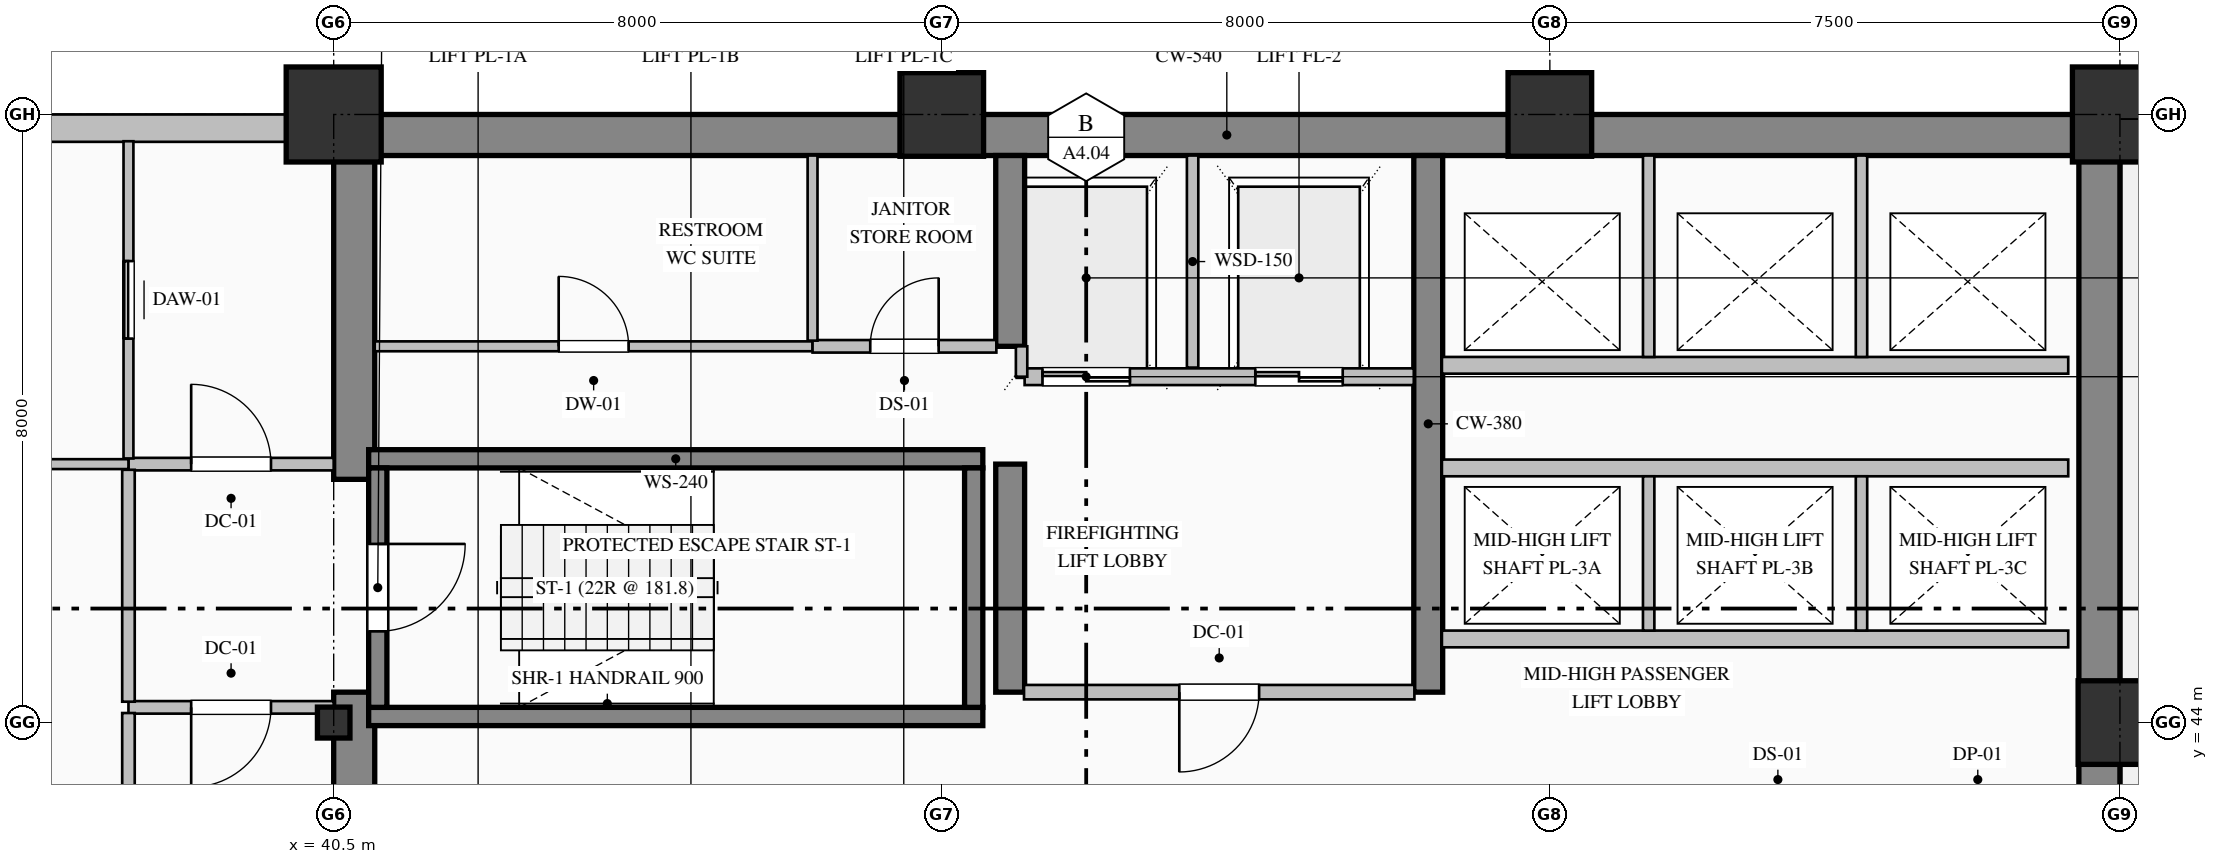
"""IFC4 building model, lengths in metres.
Left out: names, types, materials, properties, quantities, classifications, styles, units other than length and angle.
Written with IfcOpenShell. Run it as: python <this file> out.ifc"""

import sys

from ifc_helpers import new_model, si_unit, direction, frame, frame_2d, origin, origin_2d, place, context, subcontext, project, spatial, rectangle, hollow_rectangle, i_section, extrude, element, fill, save


model = new_model("IFC4")
c1 = context("Model", 3, precision=1e-05, world=origin(), true_north=direction((0.0, 1.0)))
c2 = subcontext(c1, "Body", "Model", "MODEL_VIEW")
j1 = project(units=[si_unit("LENGTHUNIT", "METRE"), si_unit("PLANEANGLEUNIT", "RADIAN")], contexts=[c1])
p1 = place(None, origin())
s1 = spatial("IfcSite", under=j1, at=p1, CompositionType="ELEMENT")
p2 = place(p1, origin())
s2 = spatial("IfcBuilding", under=s1, at=p2, CompositionType="ELEMENT")
p3 = place(p2, frame((0.0, 0.0, 28.2)))
s3 = spatial("IfcBuildingStorey", under=s2, at=p3, CompositionType="ELEMENT", Elevation=28.2)
p4 = place(p3, frame((40.5, 51.73, 0.0), z_axis=(0.0, 0.0, 1.0), x_axis=(1.0, 0.0, 0.0)))
e1 = element("IfcWall", 1, at=p4, inside=s3, PredefinedType="SHEAR", context=c2, shape_type="SweptSolid", body=[
    extrude(rectangle(XDim=23.5, YDim=0.54, at=frame_2d((11.75, 0.0))), origin(), (0.0, 0.0, 1.0), 3.75),
])
p5 = place(p3, frame((63.73, 36.32, 0.0), z_axis=(0.0, 0.0, 1.0), x_axis=(0.0, 1.0, 0.0)))
e2 = element("IfcWall", 2, at=p5, inside=s3, PredefinedType="SHEAR", context=c2, shape_type="SweptSolid", body=[
    extrude(rectangle(XDim=15.14, YDim=0.54, at=frame_2d((7.57, 0.0))), origin(), (0.0, 0.0, 1.0), 3.75),
])
p6 = place(p3, frame((40.77, 36.54, 0.0), z_axis=(0.0, 0.0, 1.0), x_axis=(0.0, 1.0, 0.0)))
e3 = element("IfcWall", 3, at=p6, inside=s3, PredefinedType="SHEAR", context=c2, shape_type="SweptSolid", body=[
    extrude(rectangle(XDim=7.86, YDim=0.54, at=frame_2d((3.93, 0.0))), origin(), (0.0, 0.0, 1.0), 3.75),
])
p7 = place(p3, frame((40.77, 47.2, 0.0), z_axis=(0.0, 0.0, 1.0), x_axis=(0.0, 1.0, 0.0)))
e4 = element("IfcWall", 4, at=p7, inside=s3, PredefinedType="SHEAR", context=c2, shape_type="SweptSolid", body=[
    extrude(rectangle(XDim=4.26, YDim=0.54, at=frame_2d((2.13, 0.0))), origin(), (0.0, 0.0, 1.0), 3.75),
])
p8 = place(p3, frame((49.4, 44.4, 0.0), z_axis=(0.0, 0.0, 1.0), x_axis=(0.0, 1.0, 0.0)))
e5 = element("IfcWall", 5, at=p8, inside=s3, PredefinedType="SHEAR", context=c2, shape_type="SweptSolid", body=[
    extrude(rectangle(XDim=3.0, YDim=0.38, at=frame_2d((1.5, 0.0))), origin(), (0.0, 0.0, 1.0), 3.75),
])
p9 = place(p3, frame((49.4, 48.95, 0.0), z_axis=(0.0, 0.0, 1.0), x_axis=(0.0, 1.0, 0.0)))
e6 = element("IfcWall", 6, at=p9, inside=s3, PredefinedType="SHEAR", context=c2, shape_type="SweptSolid", body=[
    extrude(rectangle(XDim=2.51, YDim=0.38, at=frame_2d((1.255, 0.0))), origin(), (0.0, 0.0, 1.0), 3.75),
])
p10 = place(p3, frame((54.9, 44.4, 0.0), z_axis=(0.0, 0.0, 1.0), x_axis=(0.0, 1.0, 0.0)))
e7 = element("IfcWall", 7, at=p10, inside=s3, PredefinedType="SHEAR", context=c2, shape_type="SweptSolid", body=[
    extrude(rectangle(XDim=7.06, YDim=0.38, at=frame_2d((3.53, 0.0))), origin(), (0.0, 0.0, 1.0), 3.75),
])
p11 = place(p3, frame((40.5, 44.0, 0.0), z_axis=(0.0, 0.0, 1.0), x_axis=(1.0, 0.0, 0.0)))
e8 = element("IfcColumn", 8, at=p11, inside=s3, PredefinedType="COLUMN", context=c2, shape_type="SweptSolid", body=[
    extrude(i_section(OverallWidth=0.407, OverallDepth=0.428, WebThickness=0.02, FlangeThickness=0.035, FilletRadius=0.022, at=origin_2d()), origin(), (0.0, 0.0, 1.0), 4.0),
])
p12 = place(p3, frame((40.5, 52.0, 0.0), z_axis=(0.0, 0.0, 1.0), x_axis=(1.0, 0.0, 0.0)))
e9 = element("IfcColumn", 9, at=p12, inside=s3, PredefinedType="COLUMN", context=c2, shape_type="SweptSolid", body=[
    extrude(hollow_rectangle(XDim=1.25, YDim=1.25, WallThickness=0.045, at=origin_2d()), origin(), (0.0, 0.0, 1.0), 4.0),
])
for number, where, z_axis, x_axis in (
    (10, (48.5, 52.0, 0.0), (0.0, 0.0, 1.0), (1.0, 0.0, 0.0)),
    (11, (56.5, 52.0, 0.0), (0.0, 0.0, 1.0), (1.0, 0.0, 0.0)),
    (12, (64.0, 44.0, 0.0), (0.0, 0.0, 1.0), (1.0, 0.0, 0.0)),
):
    element("IfcColumn", number, at=place(p3, frame(where, z_axis=z_axis, x_axis=x_axis)), inside=s3, PredefinedType="COLUMN", context=c2, shape_type="SweptSolid", body=[
        extrude(hollow_rectangle(XDim=1.1, YDim=1.1, WallThickness=0.04, at=origin_2d()), origin(), (0.0, 0.0, 1.0), 4.0),
    ])
p13 = place(p3, frame((64.0, 52.0, 0.0), z_axis=(0.0, 0.0, 1.0), x_axis=(1.0, 0.0, 0.0)))
e13 = element("IfcColumn", 13, at=p13, inside=s3, PredefinedType="COLUMN", context=c2, shape_type="SweptSolid", body=[
    extrude(hollow_rectangle(XDim=1.25, YDim=1.25, WallThickness=0.045, at=origin_2d()), origin(), (0.0, 0.0, 1.0), 4.0),
])
p14 = place(p3, frame((4.0, 51.82, 0.0), z_axis=(0.0, 0.0, 1.0), x_axis=(1.0, 0.0, 0.0)))
e14 = element("IfcWall", 14, at=p14, inside=s3, PredefinedType="SOLIDWALL", context=c2, shape_type="SweptSolid", body=[
    extrude(rectangle(XDim=36.52, YDim=0.36, at=frame_2d((18.26, 0.0))), origin(), (0.0, 0.0, 1.0), 3.25),
])
p15 = place(p14, frame((6.3, 0.0, 0.85)))
e15 = element("IfcOpeningElement", 15, at=p15, cuts=e14, PredefinedType="OPENING", context=c2, shape_type="SweptSolid", body=[
    extrude(rectangle(XDim=1.8, YDim=2.05, at=frame_2d((0.9, 1.025))), frame((0.0, 0.19, 0.0), z_axis=(0.0, -1.0, 0.0), x_axis=(1.0, 0.0, 0.0)), (0.0, 0.0, 1.0), 0.38),
])
p16 = place(p14, frame((17.1, 0.0, 0.85)))
e16 = element("IfcOpeningElement", 16, at=p16, cuts=e14, PredefinedType="OPENING", context=c2, shape_type="SweptSolid", body=[
    extrude(rectangle(XDim=1.8, YDim=2.05, at=frame_2d((0.9, 1.025))), frame((0.0, 0.19, 0.0), z_axis=(0.0, -1.0, 0.0), x_axis=(1.0, 0.0, 0.0)), (0.0, 0.0, 1.0), 0.38),
])
p17 = place(p14, frame((24.0, 0.0, 0.8)))
e17 = element("IfcOpeningElement", 17, at=p17, cuts=e14, PredefinedType="OPENING", context=c2, shape_type="SweptSolid", body=[
    extrude(rectangle(XDim=2.4, YDim=2.15, at=frame_2d((1.2, 1.075))), frame((0.0, 0.19, 0.0), z_axis=(0.0, -1.0, 0.0), x_axis=(1.0, 0.0, 0.0)), (0.0, 0.0, 1.0), 0.38),
])
for number, where, z_axis, x_axis in (
    (18, (40.96, 47.47, 0.0), (0.0, 0.0, 1.0), (1.0, 0.0, 0.0)),
    (19, (49.04, 44.08, 0.0), (0.0, 0.0, 1.0), (-1.0, 0.0, 0.0)),
):
    element("IfcWall", number, at=place(p3, frame(where, z_axis=z_axis, x_axis=x_axis)), inside=s3, PredefinedType="SOLIDWALL", context=c2, shape_type="SweptSolid", body=[
        extrude(rectangle(XDim=8.08, YDim=0.24, at=frame_2d((4.04, 0.0))), origin(), (0.0, 0.0, 1.0), 4.0),
    ])
p18 = place(p3, frame((41.08, 47.35, 0.0), z_axis=(0.0, 0.0, 1.0), x_axis=(0.0, -1.0, 0.0)))
e20 = element("IfcWall", 20, at=p18, inside=s3, PredefinedType="SOLIDWALL", context=c2, shape_type="SweptSolid", body=[
    extrude(rectangle(XDim=3.15, YDim=0.24, at=frame_2d((1.575, 0.0))), origin(), (0.0, 0.0, 1.0), 4.0),
])
p19 = place(p18, frame((1.0, 0.0, 0.0)))
e21 = element("IfcOpeningElement", 21, at=p19, cuts=e20, PredefinedType="OPENING", context=c2, shape_type="SweptSolid", body=[
    extrude(rectangle(XDim=1.15, YDim=2.2, at=frame_2d((0.575, 1.1))), frame((0.0, 0.13, 0.0), z_axis=(0.0, -1.0, 0.0), x_axis=(1.0, 0.0, 0.0)), (0.0, 0.0, 1.0), 0.26),
])
p20 = place(p3, frame((48.92, 44.2, 0.0), z_axis=(0.0, 0.0, 1.0), x_axis=(0.0, 1.0, 0.0)))
e22 = element("IfcWall", 22, at=p20, inside=s3, PredefinedType="SOLIDWALL", context=c2, shape_type="SweptSolid", body=[
    extrude(rectangle(XDim=3.15, YDim=0.24, at=frame_2d((1.575, 0.0))), origin(), (0.0, 0.0, 1.0), 4.0),
])
p21 = place(p3, frame((54.71, 48.55, 0.0), z_axis=(0.0, 0.0, 1.0), x_axis=(-1.0, 0.0, 0.0)))
e23 = element("IfcWall", 23, at=p21, inside=s3, PredefinedType="PARTITIONING", context=c2, shape_type="SweptSolid", body=[
    extrude(rectangle(XDim=5.12, YDim=0.22, at=frame_2d((2.56, 0.0))), origin(), (0.0, 0.0, 1.0), 3.75),
])
p22 = place(p21, frame((3.735, 0.0, 0.0)))
e24 = element("IfcOpeningElement", 24, at=p22, cuts=e23, PredefinedType="OPENING", context=c2, shape_type="SweptSolid", body=[
    extrude(rectangle(XDim=1.15, YDim=2.2, at=frame_2d((0.575, 1.1))), frame((0.0, 0.12, 0.0), z_axis=(0.0, -1.0, 0.0), x_axis=(1.0, 0.0, 0.0)), (0.0, 0.0, 1.0), 0.24),
])
p23 = place(p21, frame((0.935, 0.0, 0.0)))
e25 = element("IfcOpeningElement", 25, at=p23, cuts=e23, PredefinedType="OPENING", context=c2, shape_type="SweptSolid", body=[
    extrude(rectangle(XDim=1.15, YDim=2.2, at=frame_2d((0.575, 1.1))), frame((0.0, 0.12, 0.0), z_axis=(0.0, -1.0, 0.0), x_axis=(1.0, 0.0, 0.0)), (0.0, 0.0, 1.0), 0.24),
])
p24 = place(p3, frame((51.8, 48.67, 0.0), z_axis=(0.0, 0.0, 1.0), x_axis=(0.0, 1.0, 0.0)))
e26 = element("IfcWall", 26, at=p24, inside=s3, PredefinedType="PARTITIONING", context=c2, shape_type="SweptSolid", body=[
    extrude(rectangle(XDim=2.79, YDim=0.15, at=frame_2d((1.395, 0.0))), origin(), (0.0, 0.0, 1.0), 3.75),
])
p25 = place(p3, frame((49.55, 48.55, 0.0), z_axis=(0.0, 0.0, 1.0), x_axis=(0.0, 1.0, 0.0)))
e27 = element("IfcWall", 27, at=p25, inside=s3, PredefinedType="PARTITIONING", context=c2, shape_type="SweptSolid", body=[
    extrude(rectangle(XDim=0.4, YDim=0.15, at=frame_2d((0.2, 0.0))), origin(), (0.0, 0.0, 1.0), 3.75),
])
for number, where, z_axis, x_axis in (
    (28, (63.32, 45.1, 0.0), (0.0, 0.0, 1.0), (-1.0, 0.0, 0.0)),
    (29, (55.08, 47.35, 0.0), (0.0, 0.0, 1.0), (1.0, 0.0, 0.0)),
):
    element("IfcWall", number, at=place(p3, frame(where, z_axis=z_axis, x_axis=x_axis)), inside=s3, PredefinedType="PARTITIONING", context=c2, shape_type="SweptSolid", body=[
        extrude(rectangle(XDim=8.24, YDim=0.22, at=frame_2d((4.12, 0.0))), origin(), (0.0, 0.0, 1.0), 3.75),
    ])
for number, where, z_axis, x_axis in (
    (30, (57.8, 45.21, 0.0), (0.0, 0.0, 1.0), (0.0, 1.0, 0.0)),
    (31, (60.6, 45.21, 0.0), (0.0, 0.0, 1.0), (0.0, 1.0, 0.0)),
):
    element("IfcWall", number, at=place(p3, frame(where, z_axis=z_axis, x_axis=x_axis)), inside=s3, PredefinedType="PARTITIONING", context=c2, shape_type="SweptSolid", body=[
        extrude(rectangle(XDim=2.03, YDim=0.15, at=frame_2d((1.015, 0.0))), origin(), (0.0, 0.0, 1.0), 3.75),
    ])
p26 = place(p3, frame((63.32, 48.7, 0.0), z_axis=(0.0, 0.0, 1.0), x_axis=(-1.0, 0.0, 0.0)))
e32 = element("IfcWall", 32, at=p26, inside=s3, PredefinedType="PARTITIONING", context=c2, shape_type="SweptSolid", body=[
    extrude(rectangle(XDim=8.24, YDim=0.22, at=frame_2d((4.12, 0.0))), origin(), (0.0, 0.0, 1.0), 3.75),
])
for number, where, z_axis, x_axis in (
    (33, (57.8, 48.81, 0.0), (0.0, 0.0, 1.0), (0.0, 1.0, 0.0)),
    (34, (60.6, 48.81, 0.0), (0.0, 0.0, 1.0), (0.0, 1.0, 0.0)),
):
    element("IfcWall", number, at=place(p3, frame(where, z_axis=z_axis, x_axis=x_axis)), inside=s3, PredefinedType="PARTITIONING", context=c2, shape_type="SweptSolid", body=[
        extrude(rectangle(XDim=2.65, YDim=0.15, at=frame_2d((1.325, 0.0))), origin(), (0.0, 0.0, 1.0), 3.75),
    ])
p27 = place(p3, frame((37.8, 47.4, 0.0), z_axis=(0.0, 0.0, 1.0), x_axis=(1.0, 0.0, 0.0)))
e35 = element("IfcWall", 35, at=p27, inside=s3, PredefinedType="PARTITIONING", context=c2, shape_type="SweptSolid", body=[
    extrude(rectangle(XDim=2.7, YDim=0.165, at=frame_2d((1.35, 0.0))), origin(), (0.0, 0.0, 1.0), 3.75),
])
p28 = place(p27, frame((0.825, 0.0, 0.0)))
e36 = element("IfcOpeningElement", 36, at=p28, cuts=e35, PredefinedType="OPENING", context=c2, shape_type="SweptSolid", body=[
    extrude(rectangle(XDim=1.05, YDim=2.15, at=frame_2d((0.525, 1.075))), frame((0.0, 0.093, 0.0), z_axis=(0.0, -1.0, 0.0), x_axis=(1.0, 0.0, 0.0)), (0.0, 0.0, 1.0), 0.185),
])
p29 = place(p3, frame((40.5, 44.2, 0.0), z_axis=(0.0, 0.0, 1.0), x_axis=(-1.0, 0.0, 0.0)))
e37 = element("IfcWall", 37, at=p29, inside=s3, PredefinedType="PARTITIONING", context=c2, shape_type="SweptSolid", body=[
    extrude(rectangle(XDim=2.7, YDim=0.165, at=frame_2d((1.35, 0.0))), origin(), (0.0, 0.0, 1.0), 3.75),
])
p30 = place(p29, frame((0.825, 0.0, 0.0)))
e38 = element("IfcOpeningElement", 38, at=p30, cuts=e37, PredefinedType="OPENING", context=c2, shape_type="SweptSolid", body=[
    extrude(rectangle(XDim=1.05, YDim=2.15, at=frame_2d((0.525, 1.075))), frame((0.0, 0.093, 0.0), z_axis=(0.0, -1.0, 0.0), x_axis=(1.0, 0.0, 0.0)), (0.0, 0.0, 1.0), 0.185),
])
p31 = place(p3, frame((37.8, 44.274, 0.0), z_axis=(0.0, 0.0, 1.0), x_axis=(0.0, 1.0, 0.0)))
e39 = element("IfcWall", 39, at=p31, inside=s3, PredefinedType="PARTITIONING", context=c2, shape_type="SweptSolid", body=[
    extrude(rectangle(XDim=3.051, YDim=0.165, at=frame_2d((1.525, 0.0))), origin(), (0.0, 0.0, 1.0), 3.75),
])
p32 = place(p3, frame((37.8, 47.475, 0.0), z_axis=(0.0, 0.0, 1.0), x_axis=(0.0, 1.0, 0.0)))
e40 = element("IfcWall", 40, at=p32, inside=s3, PredefinedType="PARTITIONING", context=c2, shape_type="SweptSolid", body=[
    extrude(rectangle(XDim=4.173, YDim=0.13, at=frame_2d((2.087, 0.0))), origin(), (0.0, 0.0, 1.0), 3.75),
])
p33 = place(p32, frame((1.577, 0.0, 0.0)))
e41 = element("IfcOpeningElement", 41, at=p33, cuts=e40, PredefinedType="OPENING", context=c2, shape_type="SweptSolid", body=[
    extrude(rectangle(XDim=1.02, YDim=2.15, at=frame_2d((0.51, 1.075))), frame((0.0, 0.075, 0.0), z_axis=(0.0, -1.0, 0.0), x_axis=(1.0, 0.0, 0.0)), (0.0, 0.0, 1.0), 0.15),
])
p34 = place(p3, frame((37.8, 47.4, 0.0), z_axis=(0.0, 0.0, 1.0), x_axis=(-1.0, 0.0, 0.0)))
e42 = element("IfcWall", 42, at=p34, inside=s3, PredefinedType="PARTITIONING", context=c2, shape_type="SweptSolid", body=[
    extrude(rectangle(XDim=2.4, YDim=0.13, at=frame_2d((1.2, 0.0))), origin(), (0.0, 0.0, 1.0), 3.75),
])
p35 = place(p3, frame((41.04, 48.95, 0.0), z_axis=(0.0, 0.0, 1.0), x_axis=(1.0, 0.0, 0.0)))
e43 = element("IfcWall", 43, at=p35, inside=s3, PredefinedType="PARTITIONING", context=c2, shape_type="SweptSolid", body=[
    extrude(rectangle(XDim=5.76, YDim=0.13, at=frame_2d((2.88, 0.0))), origin(), (0.0, 0.0, 1.0), 3.75),
])
p36 = place(p35, frame((2.42, 0.0, 0.0)))
e44 = element("IfcOpeningElement", 44, at=p36, cuts=e43, PredefinedType="OPENING", context=c2, shape_type="SweptSolid", body=[
    extrude(rectangle(XDim=0.92, YDim=2.15, at=frame_2d((0.46, 1.075))), frame((0.0, 0.075, 0.0), z_axis=(0.0, -1.0, 0.0), x_axis=(1.0, 0.0, 0.0)), (0.0, 0.0, 1.0), 0.15),
])
p37 = place(p3, frame((46.8, 48.95, 0.0), z_axis=(0.0, 0.0, 1.0), x_axis=(1.0, 0.0, 0.0)))
e45 = element("IfcWall", 45, at=p37, inside=s3, PredefinedType="PARTITIONING", context=c2, shape_type="SweptSolid", body=[
    extrude(rectangle(XDim=2.418, YDim=0.165, at=frame_2d((1.209, 0.0))), origin(), (0.0, 0.0, 1.0), 3.75),
])
p38 = place(p37, frame((0.759, 0.0, 0.0)))
e46 = element("IfcOpeningElement", 46, at=p38, cuts=e45, PredefinedType="OPENING", context=c2, shape_type="SweptSolid", body=[
    extrude(rectangle(XDim=0.9, YDim=2.15, at=frame_2d((0.45, 1.075))), frame((0.0, 0.093, 0.0), z_axis=(0.0, -1.0, 0.0), x_axis=(1.0, 0.0, 0.0)), (0.0, 0.0, 1.0), 0.185),
])
p39 = place(p3, frame((54.718, 44.4, 0.0), z_axis=(0.0, 0.0, 1.0), x_axis=(-1.0, 0.0, 0.0)))
e47 = element("IfcWall", 47, at=p39, inside=s3, PredefinedType="PARTITIONING", context=c2, shape_type="SweptSolid", body=[
    extrude(rectangle(XDim=5.136, YDim=0.19, at=frame_2d((2.568, 0.0))), origin(), (0.0, 0.0, 1.0), 3.75),
])
p40 = place(p39, frame((2.043, 0.0, 0.0)))
e48 = element("IfcOpeningElement", 48, at=p40, cuts=e47, PredefinedType="OPENING", context=c2, shape_type="SweptSolid", body=[
    extrude(rectangle(XDim=1.05, YDim=2.15, at=frame_2d((0.525, 1.075))), frame((0.0, 0.105, 0.0), z_axis=(0.0, -1.0, 0.0), x_axis=(1.0, 0.0, 0.0)), (0.0, 0.0, 1.0), 0.21),
])
p41 = place(p3, frame((46.8, 51.46, 0.0), z_axis=(0.0, 0.0, 1.0), x_axis=(0.0, -1.0, 0.0)))
e49 = element("IfcWall", 49, at=p41, inside=s3, PredefinedType="PARTITIONING", context=c2, shape_type="SweptSolid", body=[
    extrude(rectangle(XDim=2.436, YDim=0.13, at=frame_2d((1.218, 0.0))), origin(), (0.0, 0.0, 1.0), 3.75),
])
p42 = place(p3, frame((37.8, 40.475, 0.0), z_axis=(0.0, 0.0, 1.0), x_axis=(0.0, 1.0, 0.0)))
e50 = element("IfcWall", 50, at=p42, inside=s3, PredefinedType="PARTITIONING", context=c2, shape_type="SweptSolid", body=[
    extrude(rectangle(XDim=3.651, YDim=0.165, at=frame_2d((1.825, 0.0))), origin(), (0.0, 0.0, 1.0), 3.75),
])
p43 = place(p19, origin())
e51 = element("IfcDoor", 51, at=p43, inside=s3, OperationType="SINGLE_SWING_LEFT", PredefinedType="DOOR", context=c2, shape_type="SweptSolid", body=[
    extrude(rectangle(XDim=1.15, YDim=2.2, at=frame_2d((0.575, 1.1))), frame((0.0, 0.025, 0.0), z_axis=(0.0, -1.0, 0.0), x_axis=(1.0, 0.0, 0.0)), (0.0, 0.0, 1.0), 0.05),
])
fill(e21, e51)
p44 = place(p22, origin())
e52 = element("IfcDoor", 52, at=p44, inside=s3, OperationType="DOUBLE_DOOR_SLIDING", PredefinedType="DOOR", context=c2, shape_type="SweptSolid", body=[
    extrude(rectangle(XDim=1.15, YDim=2.2, at=frame_2d((0.575, 1.1))), frame((0.0, 0.025, 0.0), z_axis=(0.0, -1.0, 0.0), x_axis=(1.0, 0.0, 0.0)), (0.0, 0.0, 1.0), 0.05),
])
fill(e24, e52)
p45 = place(p23, origin())
e53 = element("IfcDoor", 53, at=p45, inside=s3, OperationType="DOUBLE_DOOR_SLIDING", PredefinedType="DOOR", context=c2, shape_type="SweptSolid", body=[
    extrude(rectangle(XDim=1.15, YDim=2.2, at=frame_2d((0.575, 1.1))), frame((0.0, 0.025, 0.0), z_axis=(0.0, -1.0, 0.0), x_axis=(1.0, 0.0, 0.0)), (0.0, 0.0, 1.0), 0.05),
])
fill(e25, e53)
p46 = place(p40, origin())
e54 = element("IfcDoor", 54, at=p46, inside=s3, OperationType="SINGLE_SWING_RIGHT", PredefinedType="DOOR", context=c2, shape_type="SweptSolid", body=[
    extrude(rectangle(XDim=1.05, YDim=2.15, at=frame_2d((0.525, 1.075))), frame((0.0, 0.025, 0.0), z_axis=(0.0, -1.0, 0.0), x_axis=(1.0, 0.0, 0.0)), (0.0, 0.0, 1.0), 0.05),
])
fill(e48, e54)
p47 = place(p28, origin())
e55 = element("IfcDoor", 55, at=p47, inside=s3, OperationType="SINGLE_SWING_LEFT", PredefinedType="DOOR", context=c2, shape_type="SweptSolid", body=[
    extrude(rectangle(XDim=1.05, YDim=2.15, at=frame_2d((0.525, 1.075))), frame((0.0, 0.025, 0.0), z_axis=(0.0, -1.0, 0.0), x_axis=(1.0, 0.0, 0.0)), (0.0, 0.0, 1.0), 0.05),
])
fill(e36, e55)
p48 = place(p30, origin())
e56 = element("IfcDoor", 56, at=p48, inside=s3, OperationType="SINGLE_SWING_RIGHT", PredefinedType="DOOR", context=c2, shape_type="SweptSolid", body=[
    extrude(rectangle(XDim=1.05, YDim=2.15, at=frame_2d((0.525, 1.075))), frame((0.0, 0.025, 0.0), z_axis=(0.0, -1.0, 0.0), x_axis=(1.0, 0.0, 0.0)), (0.0, 0.0, 1.0), 0.05),
])
fill(e38, e56)
p49 = place(p33, origin())
e57 = element("IfcDoor", 57, at=p49, inside=s3, OperationType="SLIDING_TO_LEFT", PredefinedType="DOOR", context=c2, shape_type="SweptSolid", body=[
    extrude(rectangle(XDim=1.02, YDim=2.15, at=frame_2d((0.51, 1.075))), frame((0.0, 0.025, 0.0), z_axis=(0.0, -1.0, 0.0), x_axis=(1.0, 0.0, 0.0)), (0.0, 0.0, 1.0), 0.05),
])
fill(e41, e57)
p50 = place(p36, origin())
e58 = element("IfcDoor", 58, at=p50, inside=s3, OperationType="SINGLE_SWING_LEFT", PredefinedType="DOOR", context=c2, shape_type="SweptSolid", body=[
    extrude(rectangle(XDim=0.92, YDim=2.15, at=frame_2d((0.46, 1.075))), frame((0.0, 0.025, 0.0), z_axis=(0.0, -1.0, 0.0), x_axis=(1.0, 0.0, 0.0)), (0.0, 0.0, 1.0), 0.05),
])
fill(e44, e58)
p51 = place(p38, origin())
e59 = element("IfcDoor", 59, at=p51, inside=s3, OperationType="SINGLE_SWING_RIGHT", PredefinedType="DOOR", context=c2, shape_type="SweptSolid", body=[
    extrude(rectangle(XDim=0.9, YDim=2.15, at=frame_2d((0.45, 1.075))), frame((0.0, 0.025, 0.0), z_axis=(0.0, -1.0, 0.0), x_axis=(1.0, 0.0, 0.0)), (0.0, 0.0, 1.0), 0.05),
])
fill(e46, e59)
save(model, sys.argv[1])
